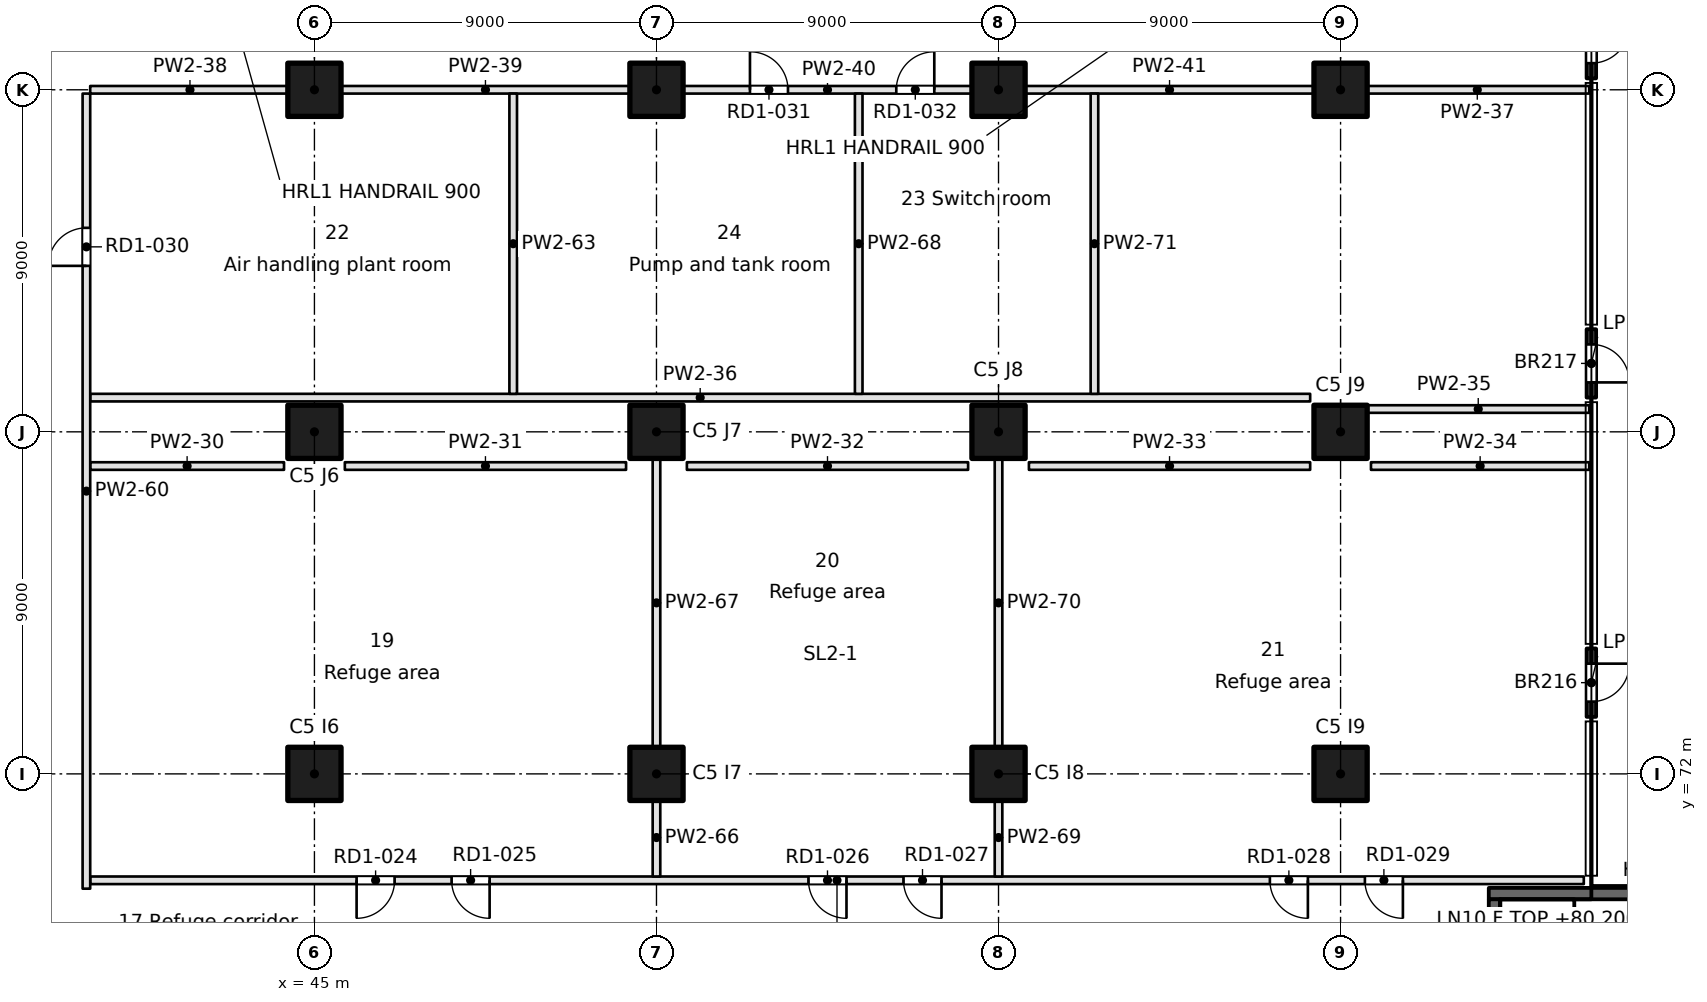
"""IFC4 building model, lengths in metres.
Left out: names, types, materials, properties, quantities, classifications, styles, units other than length and angle.
Written with IfcOpenShell. Run it as: python <this file> out.ifc"""

import sys

from ifc_helpers import new_model, si_unit, direction, frame, frame_2d, origin, origin_2d, place, context, subcontext, project, spatial, rectangle, extrude, element, fill, save


model = new_model("IFC4")
c1 = context("Model", 3, precision=1e-05, world=origin(), true_north=direction((0.0, 1.0)))
c2 = subcontext(c1, "Body", "Model", "MODEL_VIEW")
j1 = project(units=[si_unit("LENGTHUNIT", "METRE"), si_unit("PLANEANGLEUNIT", "RADIAN")], contexts=[c1])
p1 = place(None, origin())
s1 = spatial("IfcSite", under=j1, at=p1, CompositionType="ELEMENT")
p2 = place(p1, origin())
s2 = spatial("IfcBuilding", under=s1, at=p2, CompositionType="ELEMENT")
p3 = place(p2, frame((0.0, 0.0, 80.2)))
s3 = spatial("IfcBuildingStorey", under=s2, at=p3, CompositionType="ELEMENT", Elevation=80.2)
for number, where, z_axis, x_axis in (
    (1, (45.0, 72.0, 0.0), (0.0, 0.0, 1.0), (1.0, 0.0, 0.0)),
    (2, (45.0, 81.0, 0.0), (0.0, 0.0, 1.0), (1.0, 0.0, 0.0)),
    (3, (45.0, 90.0, 0.0), (0.0, 0.0, 1.0), (1.0, 0.0, 0.0)),
    (4, (54.0, 72.0, 0.0), (0.0, 0.0, 1.0), (1.0, 0.0, 0.0)),
    (5, (54.0, 81.0, 0.0), (0.0, 0.0, 1.0), (1.0, 0.0, 0.0)),
    (6, (54.0, 90.0, 0.0), (0.0, 0.0, 1.0), (1.0, 0.0, 0.0)),
    (7, (63.0, 72.0, 0.0), (0.0, 0.0, 1.0), (1.0, 0.0, 0.0)),
    (8, (63.0, 81.0, 0.0), (0.0, 0.0, 1.0), (1.0, 0.0, 0.0)),
    (9, (63.0, 90.0, 0.0), (0.0, 0.0, 1.0), (1.0, 0.0, 0.0)),
    (10, (72.0, 72.0, 0.0), (0.0, 0.0, 1.0), (1.0, 0.0, 0.0)),
    (11, (72.0, 81.0, 0.0), (0.0, 0.0, 1.0), (1.0, 0.0, 0.0)),
    (12, (72.0, 90.0, 0.0), (0.0, 0.0, 1.0), (1.0, 0.0, 0.0)),
):
    element("IfcColumn", number, at=place(p3, frame(where, z_axis=z_axis, x_axis=x_axis)), inside=s3, PredefinedType="COLUMN", context=c2, shape_type="SweptSolid", body=[
        extrude(rectangle(XDim=1.4, YDim=1.4, at=origin_2d()), origin(), (0.0, 0.0, 1.0), 4.6),
    ])
p4 = place(p3, frame((78.599, 73.501, 0.0), z_axis=(0.0, 0.0, 1.0), x_axis=(0.0, 1.0, 0.0)))
e13 = element("IfcWall", 13, at=p4, inside=s3, PredefinedType="SOLIDWALL", context=c2, shape_type="SweptSolid", body=[
    extrude(rectangle(XDim=1.8, YDim=0.25, at=frame_2d((0.9, 0.0))), origin(), (0.0, 0.0, 1.0), 4.2),
])
p5 = place(p4, frame((0.4, 0.0, 0.0)))
e14 = element("IfcOpeningElement", 14, at=p5, cuts=e13, PredefinedType="OPENING", context=c2, shape_type="SweptSolid", body=[
    extrude(rectangle(XDim=1.0, YDim=2.1, at=frame_2d((0.5, 1.05))), frame((0.0, 0.125, 0.0), z_axis=(0.0, -1.0, 0.0), x_axis=(1.0, 0.0, 0.0)), (0.0, 0.0, 1.0), 0.25),
])
p6 = place(p3, frame((78.599, 81.9, 0.0), z_axis=(0.0, 0.0, 1.0), x_axis=(0.0, 1.0, 0.0)))
e15 = element("IfcWall", 15, at=p6, inside=s3, PredefinedType="SOLIDWALL", context=c2, shape_type="SweptSolid", body=[
    extrude(rectangle(XDim=1.8, YDim=0.25, at=frame_2d((0.9, 0.0))), origin(), (0.0, 0.0, 1.0), 4.2),
])
p7 = place(p6, frame((0.4, 0.0, 0.0)))
e16 = element("IfcOpeningElement", 16, at=p7, cuts=e15, PredefinedType="OPENING", context=c2, shape_type="SweptSolid", body=[
    extrude(rectangle(XDim=1.0, YDim=2.1, at=frame_2d((0.5, 1.05))), frame((0.0, 0.125, 0.0), z_axis=(0.0, -1.0, 0.0), x_axis=(1.0, 0.0, 0.0)), (0.0, 0.0, 1.0), 0.25),
])
p8 = place(p3, frame((78.599, 90.3, 0.0), z_axis=(0.0, 0.0, 1.0), x_axis=(0.0, 1.0, 0.0)))
e17 = element("IfcWall", 17, at=p8, inside=s3, PredefinedType="SOLIDWALL", context=c2, shape_type="SweptSolid", body=[
    extrude(rectangle(XDim=1.8, YDim=0.25, at=frame_2d((0.9, 0.0))), origin(), (0.0, 0.0, 1.0), 4.2),
])
p9 = place(p8, frame((0.4, 0.0, 0.0)))
e18 = element("IfcOpeningElement", 18, at=p9, cuts=e17, PredefinedType="OPENING", context=c2, shape_type="SweptSolid", body=[
    extrude(rectangle(XDim=1.0, YDim=2.1, at=frame_2d((0.5, 1.05))), frame((0.0, 0.125, 0.0), z_axis=(0.0, -1.0, 0.0), x_axis=(1.0, 0.0, 0.0)), (0.0, 0.0, 1.0), 0.25),
])
p10 = place(p3, frame((75.9, 68.85, -0.45), z_axis=(0.0, 0.0, 1.0), x_axis=(1.0, 0.0, 0.0)))
e19 = element("IfcWall", 19, at=p10, inside=s3, PredefinedType="SOLIDWALL", context=c2, shape_type="SweptSolid", body=[
    extrude(rectangle(XDim=8.2, YDim=0.3, at=frame_2d((4.1, 0.0))), origin(), (0.0, 0.0, 1.0), 4.65),
])
p11 = place(p3, frame((76.05, 64.4, -0.45), z_axis=(0.0, 0.0, 1.0), x_axis=(0.0, 1.0, 0.0)))
e20 = element("IfcWall", 20, at=p11, inside=s3, PredefinedType="SOLIDWALL", context=c2, shape_type="SweptSolid", body=[
    extrude(rectangle(XDim=4.3, YDim=0.3, at=frame_2d((2.15, 0.0))), origin(), (0.0, 0.0, 1.0), 4.65),
])
p12 = place(p11, frame((1.55, 0.0, 0.45)))
e21 = element("IfcOpeningElement", 21, at=p12, cuts=e20, PredefinedType="OPENING", context=c2, shape_type="SweptSolid", body=[
    extrude(rectangle(XDim=1.2, YDim=2.1, at=frame_2d((0.6, 1.05))), frame((0.0, 0.15, 0.0), z_axis=(0.0, -1.0, 0.0), x_axis=(1.0, 0.0, 0.0)), (0.0, 0.0, 1.0), 0.3),
])
p13 = place(p3, frame((39.1, 69.2, 0.0), z_axis=(0.0, 0.0, 1.0), x_axis=(1.0, 0.0, 0.0)))
e22 = element("IfcWall", 22, at=p13, inside=s3, PredefinedType="PARTITIONING", context=c2, shape_type="SweptSolid", body=[
    extrude(rectangle(XDim=39.3, YDim=0.2, at=frame_2d((19.65, 0.0))), origin(), (0.0, 0.0, 1.0), 4.2),
])
p14 = place(p13, frame((7.01, 0.0, 0.0)))
e23 = element("IfcOpeningElement", 23, at=p14, cuts=e22, PredefinedType="OPENING", context=c2, shape_type="SweptSolid", body=[
    extrude(rectangle(XDim=1.0, YDim=2.1, at=frame_2d((0.5, 1.05))), frame((0.0, 0.1, 0.0), z_axis=(0.0, -1.0, 0.0), x_axis=(1.0, 0.0, 0.0)), (0.0, 0.0, 1.0), 0.2),
])
p15 = place(p13, frame((9.51, 0.0, 0.0)))
e24 = element("IfcOpeningElement", 24, at=p15, cuts=e22, PredefinedType="OPENING", context=c2, shape_type="SweptSolid", body=[
    extrude(rectangle(XDim=1.0, YDim=2.1, at=frame_2d((0.5, 1.05))), frame((0.0, 0.1, 0.0), z_axis=(0.0, -1.0, 0.0), x_axis=(1.0, 0.0, 0.0)), (0.0, 0.0, 1.0), 0.2),
])
p16 = place(p13, frame((18.9, 0.0, 0.0)))
e25 = element("IfcOpeningElement", 25, at=p16, cuts=e22, PredefinedType="OPENING", context=c2, shape_type="SweptSolid", body=[
    extrude(rectangle(XDim=1.0, YDim=2.1, at=frame_2d((0.5, 1.05))), frame((0.0, 0.1, 0.0), z_axis=(0.0, -1.0, 0.0), x_axis=(1.0, 0.0, 0.0)), (0.0, 0.0, 1.0), 0.2),
])
p17 = place(p13, frame((21.4, 0.0, 0.0)))
e26 = element("IfcOpeningElement", 26, at=p17, cuts=e22, PredefinedType="OPENING", context=c2, shape_type="SweptSolid", body=[
    extrude(rectangle(XDim=1.0, YDim=2.1, at=frame_2d((0.5, 1.05))), frame((0.0, 0.1, 0.0), z_axis=(0.0, -1.0, 0.0), x_axis=(1.0, 0.0, 0.0)), (0.0, 0.0, 1.0), 0.2),
])
p18 = place(p13, frame((31.04, 0.0, 0.0)))
e27 = element("IfcOpeningElement", 27, at=p18, cuts=e22, PredefinedType="OPENING", context=c2, shape_type="SweptSolid", body=[
    extrude(rectangle(XDim=1.0, YDim=2.1, at=frame_2d((0.5, 1.05))), frame((0.0, 0.1, 0.0), z_axis=(0.0, -1.0, 0.0), x_axis=(1.0, 0.0, 0.0)), (0.0, 0.0, 1.0), 0.2),
])
p19 = place(p13, frame((33.54, 0.0, 0.0)))
e28 = element("IfcOpeningElement", 28, at=p19, cuts=e22, PredefinedType="OPENING", context=c2, shape_type="SweptSolid", body=[
    extrude(rectangle(XDim=1.0, YDim=2.1, at=frame_2d((0.5, 1.05))), frame((0.0, 0.1, 0.0), z_axis=(0.0, -1.0, 0.0), x_axis=(1.0, 0.0, 0.0)), (0.0, 0.0, 1.0), 0.2),
])
p20 = place(p3, frame((39.1, 80.1, 0.0), z_axis=(0.0, 0.0, 1.0), x_axis=(1.0, 0.0, 0.0)))
e29 = element("IfcWall", 29, at=p20, inside=s3, PredefinedType="PARTITIONING", context=c2, shape_type="SweptSolid", body=[
    extrude(rectangle(XDim=5.1, YDim=0.2, at=frame_2d((2.55, 0.0))), origin(), (0.0, 0.0, 1.0), 4.2),
])
for number, where, z_axis, x_axis in (
    (30, (45.8, 80.1, 0.0), (0.0, 0.0, 1.0), (1.0, 0.0, 0.0)),
    (31, (54.8, 80.1, 0.0), (0.0, 0.0, 1.0), (1.0, 0.0, 0.0)),
    (32, (63.8, 80.1, 0.0), (0.0, 0.0, 1.0), (1.0, 0.0, 0.0)),
):
    element("IfcWall", number, at=place(p3, frame(where, z_axis=z_axis, x_axis=x_axis)), inside=s3, PredefinedType="PARTITIONING", context=c2, shape_type="SweptSolid", body=[
        extrude(rectangle(XDim=7.4, YDim=0.2, at=frame_2d((3.7, 0.0))), origin(), (0.0, 0.0, 1.0), 4.2),
    ])
p21 = place(p3, frame((72.8, 80.1, 0.0), z_axis=(0.0, 0.0, 1.0), x_axis=(1.0, 0.0, 0.0)))
e33 = element("IfcWall", 33, at=p21, inside=s3, PredefinedType="PARTITIONING", context=c2, shape_type="SweptSolid", body=[
    extrude(rectangle(XDim=5.745, YDim=0.2, at=frame_2d((2.873, 0.0))), origin(), (0.0, 0.0, 1.0), 4.2),
])
p22 = place(p3, frame((72.7, 81.6, 0.0), z_axis=(0.0, 0.0, 1.0), x_axis=(1.0, 0.0, 0.0)))
e34 = element("IfcWall", 34, at=p22, inside=s3, PredefinedType="PARTITIONING", context=c2, shape_type="SweptSolid", body=[
    extrude(rectangle(XDim=5.845, YDim=0.2, at=frame_2d((2.922, 0.0))), origin(), (0.0, 0.0, 1.0), 4.2),
])
p23 = place(p3, frame((39.1, 81.9, 0.0), z_axis=(0.0, 0.0, 1.0), x_axis=(1.0, 0.0, 0.0)))
e35 = element("IfcWall", 35, at=p23, inside=s3, PredefinedType="PARTITIONING", context=c2, shape_type="SweptSolid", body=[
    extrude(rectangle(XDim=32.1, YDim=0.2, at=frame_2d((16.05, 0.0))), origin(), (0.0, 0.0, 1.0), 4.2),
])
p24 = place(p3, frame((78.545, 90.0, 0.0), z_axis=(0.0, 0.0, 1.0), x_axis=(-1.0, 0.0, 0.0)))
e36 = element("IfcWall", 36, at=p24, inside=s3, PredefinedType="PARTITIONING", context=c2, shape_type="SweptSolid", body=[
    extrude(rectangle(XDim=5.895, YDim=0.2, at=frame_2d((2.948, 0.0))), origin(), (0.0, 0.0, 1.0), 4.2),
])
p25 = place(p3, frame((44.35, 90.0, 0.0), z_axis=(0.0, 0.0, 1.0), x_axis=(-1.0, 0.0, 0.0)))
e37 = element("IfcWall", 37, at=p25, inside=s3, PredefinedType="PARTITIONING", context=c2, shape_type="SweptSolid", body=[
    extrude(rectangle(XDim=5.25, YDim=0.2, at=frame_2d((2.625, 0.0))), origin(), (0.0, 0.0, 1.0), 4.2),
])
p26 = place(p3, frame((53.35, 90.0, 0.0), z_axis=(0.0, 0.0, 1.0), x_axis=(-1.0, 0.0, 0.0)))
e38 = element("IfcWall", 38, at=p26, inside=s3, PredefinedType="PARTITIONING", context=c2, shape_type="SweptSolid", body=[
    extrude(rectangle(XDim=7.7, YDim=0.2, at=frame_2d((3.85, 0.0))), origin(), (0.0, 0.0, 1.0), 4.2),
])
p27 = place(p3, frame((62.35, 90.0, 0.0), z_axis=(0.0, 0.0, 1.0), x_axis=(-1.0, 0.0, 0.0)))
e39 = element("IfcWall", 39, at=p27, inside=s3, PredefinedType="PARTITIONING", context=c2, shape_type="SweptSolid", body=[
    extrude(rectangle(XDim=7.7, YDim=0.2, at=frame_2d((3.85, 0.0))), origin(), (0.0, 0.0, 1.0), 4.2),
])
p28 = place(p27, frame((4.89, 0.0, 0.0)))
e40 = element("IfcOpeningElement", 40, at=p28, cuts=e39, PredefinedType="OPENING", context=c2, shape_type="SweptSolid", body=[
    extrude(rectangle(XDim=1.0, YDim=2.1, at=frame_2d((0.5, 1.05))), frame((0.0, 0.1, 0.0), z_axis=(0.0, -1.0, 0.0), x_axis=(1.0, 0.0, 0.0)), (0.0, 0.0, 1.0), 0.2),
])
p29 = place(p27, frame((1.04, 0.0, 0.0)))
e41 = element("IfcOpeningElement", 41, at=p29, cuts=e39, PredefinedType="OPENING", context=c2, shape_type="SweptSolid", body=[
    extrude(rectangle(XDim=1.0, YDim=2.1, at=frame_2d((0.5, 1.05))), frame((0.0, 0.1, 0.0), z_axis=(0.0, -1.0, 0.0), x_axis=(1.0, 0.0, 0.0)), (0.0, 0.0, 1.0), 0.2),
])
p30 = place(p3, frame((71.35, 90.0, 0.0), z_axis=(0.0, 0.0, 1.0), x_axis=(-1.0, 0.0, 0.0)))
e42 = element("IfcWall", 42, at=p30, inside=s3, PredefinedType="PARTITIONING", context=c2, shape_type="SweptSolid", body=[
    extrude(rectangle(XDim=7.7, YDim=0.2, at=frame_2d((3.85, 0.0))), origin(), (0.0, 0.0, 1.0), 4.2),
])
p31 = place(p3, frame((39.0, 89.9, 0.0), z_axis=(0.0, 0.0, 1.0), x_axis=(0.0, -1.0, 0.0)))
e43 = element("IfcWall", 43, at=p31, inside=s3, PredefinedType="PARTITIONING", context=c2, shape_type="SweptSolid", body=[
    extrude(rectangle(XDim=20.92, YDim=0.2, at=frame_2d((10.46, 0.0))), origin(), (0.0, 0.0, 1.0), 4.2),
])
p32 = place(p31, frame((3.533, 0.0, 0.0)))
e44 = element("IfcOpeningElement", 44, at=p32, cuts=e43, PredefinedType="OPENING", context=c2, shape_type="SweptSolid", body=[
    extrude(rectangle(XDim=1.0, YDim=2.1, at=frame_2d((0.5, 1.05))), frame((0.0, 0.1, 0.0), z_axis=(0.0, -1.0, 0.0), x_axis=(1.0, 0.0, 0.0)), (0.0, 0.0, 1.0), 0.2),
])
p33 = place(p3, frame((50.23, 89.9, 0.0), z_axis=(0.0, 0.0, 1.0), x_axis=(0.0, -1.0, 0.0)))
e45 = element("IfcWall", 45, at=p33, inside=s3, PredefinedType="PARTITIONING", context=c2, shape_type="SweptSolid", body=[
    extrude(rectangle(XDim=7.9, YDim=0.2, at=frame_2d((3.95, 0.0))), origin(), (0.0, 0.0, 1.0), 4.2),
])
p34 = place(p3, frame((54.0, 71.35, 0.0), z_axis=(0.0, 0.0, 1.0), x_axis=(0.0, -1.0, 0.0)))
e46 = element("IfcWall", 46, at=p34, inside=s3, PredefinedType="PARTITIONING", context=c2, shape_type="SweptSolid", body=[
    extrude(rectangle(XDim=2.05, YDim=0.2, at=frame_2d((1.025, 0.0))), origin(), (0.0, 0.0, 1.0), 4.2),
])
p35 = place(p3, frame((54.0, 80.35, 0.0), z_axis=(0.0, 0.0, 1.0), x_axis=(0.0, -1.0, 0.0)))
e47 = element("IfcWall", 47, at=p35, inside=s3, PredefinedType="PARTITIONING", context=c2, shape_type="SweptSolid", body=[
    extrude(rectangle(XDim=7.7, YDim=0.2, at=frame_2d((3.85, 0.0))), origin(), (0.0, 0.0, 1.0), 4.2),
])
p36 = place(p3, frame((59.321, 89.9, 0.0), z_axis=(0.0, 0.0, 1.0), x_axis=(0.0, -1.0, 0.0)))
e48 = element("IfcWall", 48, at=p36, inside=s3, PredefinedType="PARTITIONING", context=c2, shape_type="SweptSolid", body=[
    extrude(rectangle(XDim=7.9, YDim=0.2, at=frame_2d((3.95, 0.0))), origin(), (0.0, 0.0, 1.0), 4.2),
])
p37 = place(p3, frame((63.0, 71.35, 0.0), z_axis=(0.0, 0.0, 1.0), x_axis=(0.0, -1.0, 0.0)))
e49 = element("IfcWall", 49, at=p37, inside=s3, PredefinedType="PARTITIONING", context=c2, shape_type="SweptSolid", body=[
    extrude(rectangle(XDim=2.05, YDim=0.2, at=frame_2d((1.025, 0.0))), origin(), (0.0, 0.0, 1.0), 4.2),
])
p38 = place(p3, frame((63.0, 80.35, 0.0), z_axis=(0.0, 0.0, 1.0), x_axis=(0.0, -1.0, 0.0)))
e50 = element("IfcWall", 50, at=p38, inside=s3, PredefinedType="PARTITIONING", context=c2, shape_type="SweptSolid", body=[
    extrude(rectangle(XDim=7.7, YDim=0.2, at=frame_2d((3.85, 0.0))), origin(), (0.0, 0.0, 1.0), 4.2),
])
p39 = place(p3, frame((65.524, 89.9, 0.0), z_axis=(0.0, 0.0, 1.0), x_axis=(0.0, -1.0, 0.0)))
e51 = element("IfcWall", 51, at=p39, inside=s3, PredefinedType="PARTITIONING", context=c2, shape_type="SweptSolid", body=[
    extrude(rectangle(XDim=7.9, YDim=0.2, at=frame_2d((3.95, 0.0))), origin(), (0.0, 0.0, 1.0), 4.2),
])
p40 = place(p5, frame((1.0, 0.0, 0.0), z_axis=(0.0, 0.0, 1.0), x_axis=(-1.0, 0.0, 0.0)))
e52 = element("IfcDoor", 52, at=p40, inside=s3, OperationType="SINGLE_SWING_LEFT", PredefinedType="DOOR", context=c2, shape_type="SweptSolid", body=[
    extrude(rectangle(XDim=1.0, YDim=2.1, at=frame_2d((0.5, 1.05))), frame((0.0, 0.025, 0.0), z_axis=(0.0, -1.0, 0.0), x_axis=(1.0, 0.0, 0.0)), (0.0, 0.0, 1.0), 0.05),
])
fill(e14, e52)
p41 = place(p7, frame((1.0, 0.0, 0.0), z_axis=(0.0, 0.0, 1.0), x_axis=(-1.0, 0.0, 0.0)))
e53 = element("IfcDoor", 53, at=p41, inside=s3, OperationType="SINGLE_SWING_RIGHT", PredefinedType="DOOR", context=c2, shape_type="SweptSolid", body=[
    extrude(rectangle(XDim=1.0, YDim=2.1, at=frame_2d((0.5, 1.05))), frame((0.0, 0.025, 0.0), z_axis=(0.0, -1.0, 0.0), x_axis=(1.0, 0.0, 0.0)), (0.0, 0.0, 1.0), 0.05),
])
fill(e16, e53)
p42 = place(p9, frame((1.0, 0.0, 0.0), z_axis=(0.0, 0.0, 1.0), x_axis=(-1.0, 0.0, 0.0)))
e54 = element("IfcDoor", 54, at=p42, inside=s3, OperationType="SINGLE_SWING_LEFT", PredefinedType="DOOR", context=c2, shape_type="SweptSolid", body=[
    extrude(rectangle(XDim=1.0, YDim=2.1, at=frame_2d((0.5, 1.05))), frame((0.0, 0.025, 0.0), z_axis=(0.0, -1.0, 0.0), x_axis=(1.0, 0.0, 0.0)), (0.0, 0.0, 1.0), 0.05),
])
fill(e18, e54)
p43 = place(p14, frame((1.0, 0.0, 0.0), z_axis=(0.0, 0.0, 1.0), x_axis=(-1.0, 0.0, 0.0)))
e55 = element("IfcDoor", 55, at=p43, inside=s3, OperationType="SINGLE_SWING_RIGHT", PredefinedType="DOOR", context=c2, shape_type="SweptSolid", body=[
    extrude(rectangle(XDim=1.0, YDim=2.1, at=frame_2d((0.5, 1.05))), frame((0.0, 0.025, 0.0), z_axis=(0.0, -1.0, 0.0), x_axis=(1.0, 0.0, 0.0)), (0.0, 0.0, 1.0), 0.05),
])
fill(e23, e55)
p44 = place(p15, frame((1.0, 0.0, 0.0), z_axis=(0.0, 0.0, 1.0), x_axis=(-1.0, 0.0, 0.0)))
e56 = element("IfcDoor", 56, at=p44, inside=s3, OperationType="SINGLE_SWING_LEFT", PredefinedType="DOOR", context=c2, shape_type="SweptSolid", body=[
    extrude(rectangle(XDim=1.0, YDim=2.1, at=frame_2d((0.5, 1.05))), frame((0.0, 0.025, 0.0), z_axis=(0.0, -1.0, 0.0), x_axis=(1.0, 0.0, 0.0)), (0.0, 0.0, 1.0), 0.05),
])
fill(e24, e56)
p45 = place(p16, frame((1.0, 0.0, 0.0), z_axis=(0.0, 0.0, 1.0), x_axis=(-1.0, 0.0, 0.0)))
e57 = element("IfcDoor", 57, at=p45, inside=s3, OperationType="SINGLE_SWING_LEFT", PredefinedType="DOOR", context=c2, shape_type="SweptSolid", body=[
    extrude(rectangle(XDim=1.0, YDim=2.1, at=frame_2d((0.5, 1.05))), frame((0.0, 0.025, 0.0), z_axis=(0.0, -1.0, 0.0), x_axis=(1.0, 0.0, 0.0)), (0.0, 0.0, 1.0), 0.05),
])
fill(e25, e57)
p46 = place(p17, frame((1.0, 0.0, 0.0), z_axis=(0.0, 0.0, 1.0), x_axis=(-1.0, 0.0, 0.0)))
e58 = element("IfcDoor", 58, at=p46, inside=s3, OperationType="SINGLE_SWING_LEFT", PredefinedType="DOOR", context=c2, shape_type="SweptSolid", body=[
    extrude(rectangle(XDim=1.0, YDim=2.1, at=frame_2d((0.5, 1.05))), frame((0.0, 0.025, 0.0), z_axis=(0.0, -1.0, 0.0), x_axis=(1.0, 0.0, 0.0)), (0.0, 0.0, 1.0), 0.05),
])
fill(e26, e58)
p47 = place(p18, frame((1.0, 0.0, 0.0), z_axis=(0.0, 0.0, 1.0), x_axis=(-1.0, 0.0, 0.0)))
e59 = element("IfcDoor", 59, at=p47, inside=s3, OperationType="SINGLE_SWING_LEFT", PredefinedType="DOOR", context=c2, shape_type="SweptSolid", body=[
    extrude(rectangle(XDim=1.0, YDim=2.1, at=frame_2d((0.5, 1.05))), frame((0.0, 0.025, 0.0), z_axis=(0.0, -1.0, 0.0), x_axis=(1.0, 0.0, 0.0)), (0.0, 0.0, 1.0), 0.05),
])
fill(e27, e59)
p48 = place(p19, frame((1.0, 0.0, 0.0), z_axis=(0.0, 0.0, 1.0), x_axis=(-1.0, 0.0, 0.0)))
e60 = element("IfcDoor", 60, at=p48, inside=s3, OperationType="SINGLE_SWING_LEFT", PredefinedType="DOOR", context=c2, shape_type="SweptSolid", body=[
    extrude(rectangle(XDim=1.0, YDim=2.1, at=frame_2d((0.5, 1.05))), frame((0.0, 0.025, 0.0), z_axis=(0.0, -1.0, 0.0), x_axis=(1.0, 0.0, 0.0)), (0.0, 0.0, 1.0), 0.05),
])
fill(e28, e60)
p49 = place(p32, frame((1.0, 0.0, 0.0), z_axis=(0.0, 0.0, 1.0), x_axis=(-1.0, 0.0, 0.0)))
e61 = element("IfcDoor", 61, at=p49, inside=s3, OperationType="SINGLE_SWING_LEFT", PredefinedType="DOOR", context=c2, shape_type="SweptSolid", body=[
    extrude(rectangle(XDim=1.0, YDim=2.1, at=frame_2d((0.5, 1.05))), frame((0.0, 0.025, 0.0), z_axis=(0.0, -1.0, 0.0), x_axis=(1.0, 0.0, 0.0)), (0.0, 0.0, 1.0), 0.05),
])
fill(e44, e61)
p50 = place(p28, frame((1.0, 0.0, 0.0), z_axis=(0.0, 0.0, 1.0), x_axis=(-1.0, 0.0, 0.0)))
e62 = element("IfcDoor", 62, at=p50, inside=s3, OperationType="SINGLE_SWING_LEFT", PredefinedType="DOOR", context=c2, shape_type="SweptSolid", body=[
    extrude(rectangle(XDim=1.0, YDim=2.1, at=frame_2d((0.5, 1.05))), frame((0.0, 0.025, 0.0), z_axis=(0.0, -1.0, 0.0), x_axis=(1.0, 0.0, 0.0)), (0.0, 0.0, 1.0), 0.05),
])
fill(e40, e62)
p51 = place(p29, frame((1.0, 0.0, 0.0), z_axis=(0.0, 0.0, 1.0), x_axis=(-1.0, 0.0, 0.0)))
e63 = element("IfcDoor", 63, at=p51, inside=s3, OperationType="SINGLE_SWING_RIGHT", PredefinedType="DOOR", context=c2, shape_type="SweptSolid", body=[
    extrude(rectangle(XDim=1.0, YDim=2.1, at=frame_2d((0.5, 1.05))), frame((0.0, 0.025, 0.0), z_axis=(0.0, -1.0, 0.0), x_axis=(1.0, 0.0, 0.0)), (0.0, 0.0, 1.0), 0.05),
])
fill(e41, e63)
save(model, sys.argv[1])
